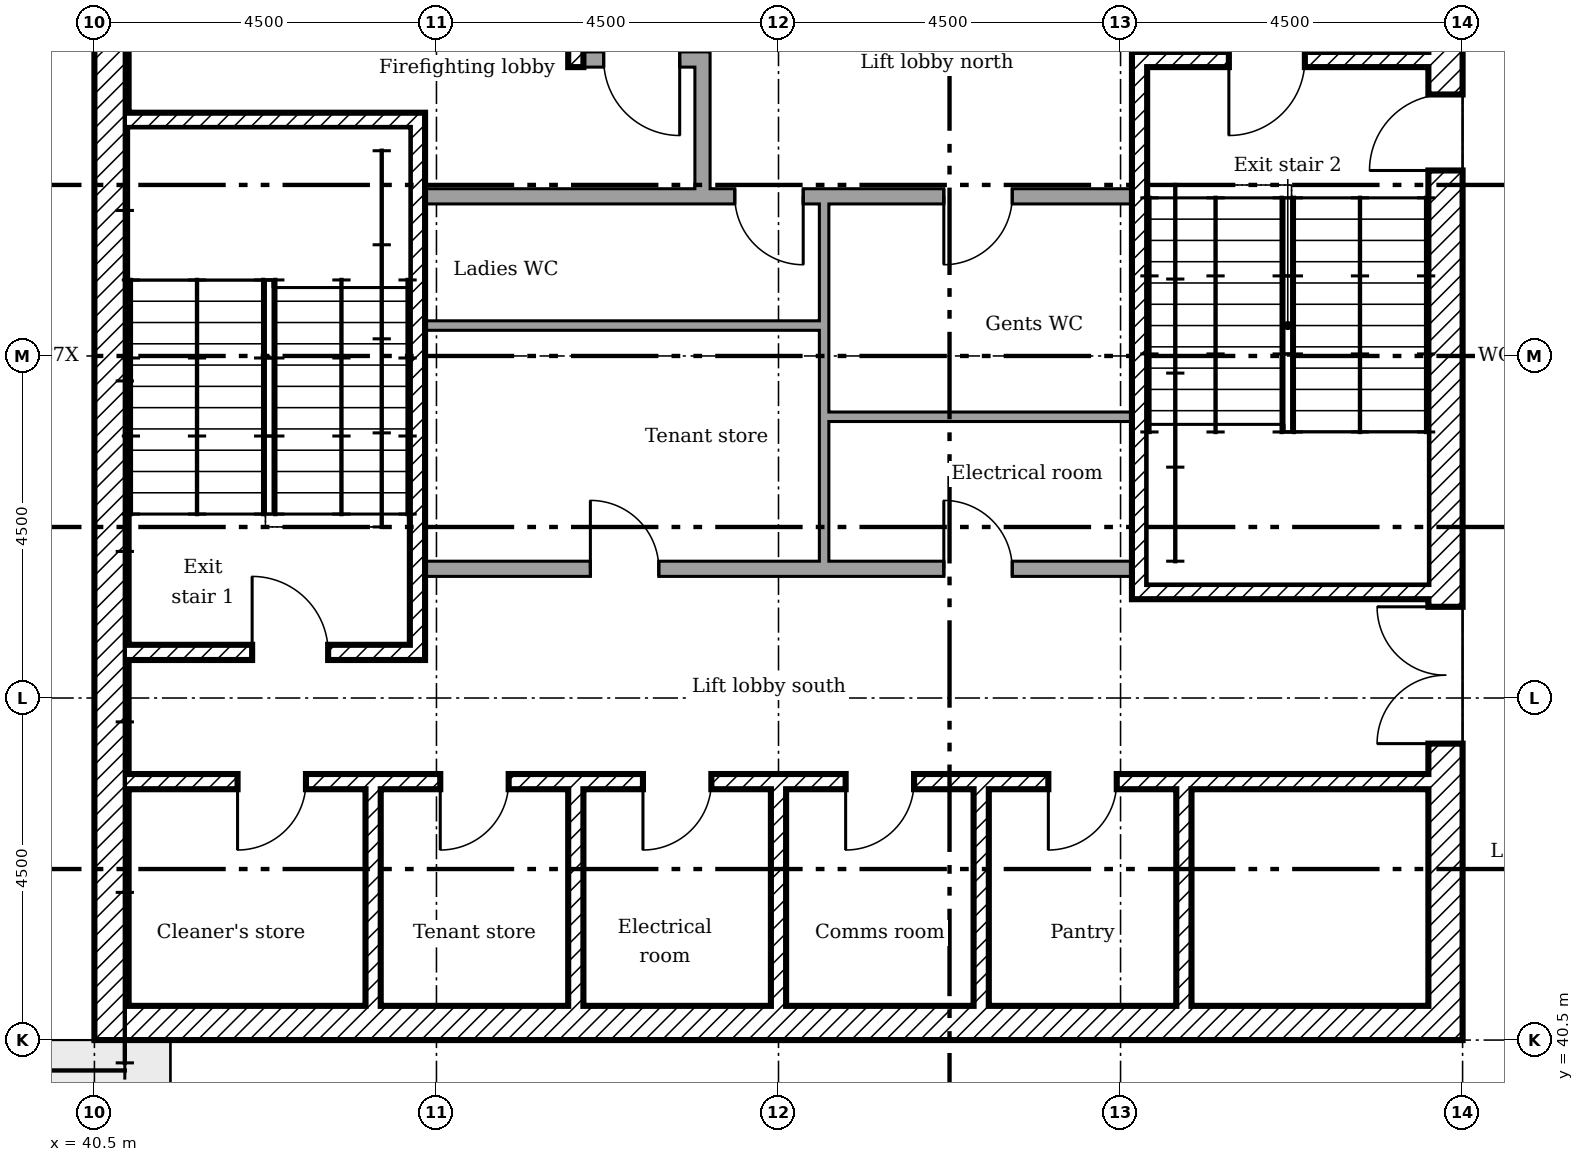
"""IFC4 building model, lengths in metres.
Left out: names, types, materials, properties, quantities, classifications, styles, units other than length and angle.
Written with IfcOpenShell. Run it as: python <this file> out.ifc"""

import sys

from ifc_helpers import new_model, si_unit, direction, frame, frame_2d, origin, place, context, subcontext, project, spatial, rectangle, extrude, element, fill, save


model = new_model("IFC4")
c1 = context("Model", 3, precision=1e-05, world=origin(), true_north=direction((0.0, 1.0)))
c2 = subcontext(c1, "Body", "Model", "MODEL_VIEW")
j1 = project(units=[si_unit("LENGTHUNIT", "METRE"), si_unit("PLANEANGLEUNIT", "RADIAN")], contexts=[c1])
p1 = place(None, origin())
s1 = spatial("IfcSite", under=j1, at=p1, CompositionType="ELEMENT")
p2 = place(p1, origin())
s2 = spatial("IfcBuilding", under=s1, at=p2, CompositionType="ELEMENT")
p3 = place(p2, frame((0.0, 0.0, 259.4)))
s3 = spatial("IfcBuildingStorey", under=s2, at=p3, CompositionType="ELEMENT", Elevation=259.4)
p4 = place(p3, frame((58.275, 40.5, 0.0), z_axis=(0.0, 0.0, 1.0), x_axis=(0.0, 1.0, 0.0)))
e1 = element("IfcWall", 1, at=p4, inside=s3, PredefinedType="SHEAR", context=c2, shape_type="SweptSolid", body=[
    extrude(rectangle(XDim=18.0, YDim=0.45, at=frame_2d((9.0, 0.0))), origin(), (0.0, 0.0, 1.0), 3.925),
])
p5 = place(p4, frame((13.15, 0.0, 0.0)))
e2 = element("IfcOpeningElement", 2, at=p5, cuts=e1, PredefinedType="OPENING", context=c2, shape_type="SweptSolid", body=[
    extrude(rectangle(XDim=1.2, YDim=2.1, at=frame_2d((0.6, 1.05))), frame((0.0, 0.235, 0.0), z_axis=(0.0, -1.0, 0.0), x_axis=(1.0, 0.0, 0.0)), (0.0, 0.0, 1.0), 0.47),
])
p6 = place(p4, frame((3.9, 0.0, 0.0)))
e3 = element("IfcOpeningElement", 3, at=p6, cuts=e1, PredefinedType="OPENING", context=c2, shape_type="SweptSolid", body=[
    extrude(rectangle(XDim=1.8, YDim=2.1, at=frame_2d((0.9, 1.05))), frame((0.0, 0.235, 0.0), z_axis=(0.0, -1.0, 0.0), x_axis=(1.0, 0.0, 0.0)), (0.0, 0.0, 1.0), 0.47),
])
p7 = place(p4, frame((11.44, 0.0, 0.0)))
e4 = element("IfcOpeningElement", 4, at=p7, cuts=e1, PredefinedType="OPENING", context=c2, shape_type="SweptSolid", body=[
    extrude(rectangle(XDim=1.0, YDim=2.1, at=frame_2d((0.5, 1.05))), frame((0.0, 0.235, 0.0), z_axis=(0.0, -1.0, 0.0), x_axis=(1.0, 0.0, 0.0)), (0.0, 0.0, 1.0), 0.47),
])
p8 = place(p3, frame((40.5, 40.725, 0.0)))
e5 = element("IfcWall", 5, at=p8, inside=s3, PredefinedType="SHEAR", context=c2, shape_type="SweptSolid", body=[
    extrude(rectangle(XDim=17.55, YDim=0.45, at=frame_2d((8.775, 0.0))), origin(), (0.0, 0.0, 1.0), 3.925),
])
p9 = place(p3, frame((40.725, 40.95, 0.0), z_axis=(0.0, 0.0, 1.0), x_axis=(0.0, 1.0, 0.0)))
e6 = element("IfcWall", 6, at=p9, inside=s3, PredefinedType="SHEAR", context=c2, shape_type="SweptSolid", body=[
    extrude(rectangle(XDim=17.1, YDim=0.45, at=frame_2d((8.55, 0.0))), origin(), (0.0, 0.0, 1.0), 3.925),
])
p10 = place(p3, frame((46.833, 58.05, 0.0), z_axis=(0.0, 0.0, 1.0), x_axis=(0.0, -1.0, 0.0)))
e7 = element("IfcWall", 7, at=p10, inside=s3, PredefinedType="SHEAR", context=c2, shape_type="SweptSolid", body=[
    extrude(rectangle(XDim=4.75, YDim=0.2, at=frame_2d((2.375, 0.0))), origin(), (0.0, 0.0, 1.0), 3.925),
])
for number, where, z_axis, x_axis in (
    (8, (44.167, 40.95, 0.0), (0.0, 0.0, 1.0), (0.0, 1.0, 0.0)),
    (9, (46.833, 40.95, 0.0), (0.0, 0.0, 1.0), (0.0, 1.0, 0.0)),
    (10, (49.5, 40.95, 0.0), (0.0, 0.0, 1.0), (0.0, 1.0, 0.0)),
    (11, (52.167, 40.95, 0.0), (0.0, 0.0, 1.0), (0.0, 1.0, 0.0)),
    (12, (54.833, 40.95, 0.0), (0.0, 0.0, 1.0), (0.0, 1.0, 0.0)),
):
    element("IfcWall", number, at=place(p3, frame(where, z_axis=z_axis, x_axis=x_axis)), inside=s3, PredefinedType="SHEAR", context=c2, shape_type="SweptSolid", body=[
        extrude(rectangle(XDim=2.85, YDim=0.2, at=frame_2d((1.425, 0.0))), origin(), (0.0, 0.0, 1.0), 3.925),
    ])
p11 = place(p3, frame((48.5, 51.6, 0.0), z_axis=(0.0, 0.0, 1.0), x_axis=(0.0, 1.0, 0.0)))
e13 = element("IfcWall", 13, at=p11, inside=s3, PredefinedType="PARTITIONING", context=c2, shape_type="SweptSolid", body=[
    extrude(rectangle(XDim=1.9, YDim=0.2, at=frame_2d((0.95, 0.0))), origin(), (0.0, 0.0, 1.0), 3.925),
])
p12 = place(p3, frame((46.933, 53.4, 0.0)))
e14 = element("IfcWall", 14, at=p12, inside=s3, PredefinedType="PARTITIONING", context=c2, shape_type="SweptSolid", body=[
    extrude(rectangle(XDim=1.467, YDim=0.2, at=frame_2d((0.733, 0.0))), origin(), (0.0, 0.0, 1.0), 3.925),
])
p13 = place(p12, frame((0.267, 0.0, 0.0)))
e15 = element("IfcOpeningElement", 15, at=p13, cuts=e14, PredefinedType="OPENING", context=c2, shape_type="SweptSolid", body=[
    extrude(rectangle(XDim=1.0, YDim=2.1, at=frame_2d((0.5, 1.05))), frame((0.0, 0.11, 0.0), z_axis=(0.0, -1.0, 0.0), x_axis=(1.0, 0.0, 0.0)), (0.0, 0.0, 1.0), 0.22),
])
p14 = place(p3, frame((40.95, 43.9, 0.0)))
e16 = element("IfcWall", 16, at=p14, inside=s3, PredefinedType="SHEAR", context=c2, shape_type="SweptSolid", body=[
    extrude(rectangle(XDim=17.1, YDim=0.2, at=frame_2d((8.55, 0.0))), origin(), (0.0, 0.0, 1.0), 3.925),
])
p15 = place(p14, frame((1.433, 0.0, 0.0)))
e17 = element("IfcOpeningElement", 17, at=p15, cuts=e16, PredefinedType="OPENING", context=c2, shape_type="SweptSolid", body=[
    extrude(rectangle(XDim=0.9, YDim=2.1, at=frame_2d((0.45, 1.05))), frame((0.0, 0.11, 0.0), z_axis=(0.0, -1.0, 0.0), x_axis=(1.0, 0.0, 0.0)), (0.0, 0.0, 1.0), 0.22),
])
p16 = place(p14, frame((4.1, 0.0, 0.0)))
e18 = element("IfcOpeningElement", 18, at=p16, cuts=e16, PredefinedType="OPENING", context=c2, shape_type="SweptSolid", body=[
    extrude(rectangle(XDim=0.9, YDim=2.1, at=frame_2d((0.45, 1.05))), frame((0.0, 0.11, 0.0), z_axis=(0.0, -1.0, 0.0), x_axis=(1.0, 0.0, 0.0)), (0.0, 0.0, 1.0), 0.22),
])
p17 = place(p14, frame((6.767, 0.0, 0.0)))
e19 = element("IfcOpeningElement", 19, at=p17, cuts=e16, PredefinedType="OPENING", context=c2, shape_type="SweptSolid", body=[
    extrude(rectangle(XDim=0.9, YDim=2.1, at=frame_2d((0.45, 1.05))), frame((0.0, 0.11, 0.0), z_axis=(0.0, -1.0, 0.0), x_axis=(1.0, 0.0, 0.0)), (0.0, 0.0, 1.0), 0.22),
])
p18 = place(p14, frame((9.433, 0.0, 0.0)))
e20 = element("IfcOpeningElement", 20, at=p18, cuts=e16, PredefinedType="OPENING", context=c2, shape_type="SweptSolid", body=[
    extrude(rectangle(XDim=0.9, YDim=2.1, at=frame_2d((0.45, 1.05))), frame((0.0, 0.11, 0.0), z_axis=(0.0, -1.0, 0.0), x_axis=(1.0, 0.0, 0.0)), (0.0, 0.0, 1.0), 0.22),
])
p19 = place(p14, frame((12.1, 0.0, 0.0)))
e21 = element("IfcOpeningElement", 21, at=p19, cuts=e16, PredefinedType="OPENING", context=c2, shape_type="SweptSolid", body=[
    extrude(rectangle(XDim=0.9, YDim=2.1, at=frame_2d((0.45, 1.05))), frame((0.0, 0.11, 0.0), z_axis=(0.0, -1.0, 0.0), x_axis=(1.0, 0.0, 0.0)), (0.0, 0.0, 1.0), 0.22),
])
p20 = place(p3, frame((44.75, 45.5, 0.0), z_axis=(0.0, 0.0, 1.0), x_axis=(0.0, 1.0, 0.0)))
e22 = element("IfcWall", 22, at=p20, inside=s3, PredefinedType="SHEAR", context=c2, shape_type="SweptSolid", body=[
    extrude(rectangle(XDim=7.2, YDim=0.2, at=frame_2d((3.6, 0.0))), origin(), (0.0, 0.0, 1.0), 3.925),
])
p21 = place(p3, frame((40.95, 52.6, 0.0)))
e23 = element("IfcWall", 23, at=p21, inside=s3, PredefinedType="SHEAR", context=c2, shape_type="SweptSolid", body=[
    extrude(rectangle(XDim=3.7, YDim=0.2, at=frame_2d((1.85, 0.0))), origin(), (0.0, 0.0, 1.0), 3.925),
])
p22 = place(p3, frame((40.95, 45.6, 0.0)))
e24 = element("IfcWall", 24, at=p22, inside=s3, PredefinedType="SHEAR", context=c2, shape_type="SweptSolid", body=[
    extrude(rectangle(XDim=3.7, YDim=0.2, at=frame_2d((1.85, 0.0))), origin(), (0.0, 0.0, 1.0), 3.925),
])
p23 = place(p22, frame((1.625, 0.0, 0.0)))
e25 = element("IfcOpeningElement", 25, at=p23, cuts=e24, PredefinedType="OPENING", context=c2, shape_type="SweptSolid", body=[
    extrude(rectangle(XDim=1.0, YDim=2.1, at=frame_2d((0.5, 1.05))), frame((0.0, 0.11, 0.0), z_axis=(0.0, -1.0, 0.0), x_axis=(1.0, 0.0, 0.0)), (0.0, 0.0, 1.0), 0.22),
])
p24 = place(p3, frame((54.15, 53.4, 0.0)))
e26 = element("IfcWall", 26, at=p24, inside=s3, PredefinedType="SHEAR", context=c2, shape_type="SweptSolid", body=[
    extrude(rectangle(XDim=3.9, YDim=0.2, at=frame_2d((1.95, 0.0))), origin(), (0.0, 0.0, 1.0), 3.925),
])
p25 = place(p24, frame((1.275, 0.0, 0.0)))
e27 = element("IfcOpeningElement", 27, at=p25, cuts=e26, PredefinedType="OPENING", context=c2, shape_type="SweptSolid", body=[
    extrude(rectangle(XDim=1.0, YDim=2.1, at=frame_2d((0.5, 1.05))), frame((0.0, 0.11, 0.0), z_axis=(0.0, -1.0, 0.0), x_axis=(1.0, 0.0, 0.0)), (0.0, 0.0, 1.0), 0.22),
])
p26 = place(p3, frame((54.15, 46.4, 0.0)))
e28 = element("IfcWall", 28, at=p26, inside=s3, PredefinedType="SHEAR", context=c2, shape_type="SweptSolid", body=[
    extrude(rectangle(XDim=3.9, YDim=0.2, at=frame_2d((1.95, 0.0))), origin(), (0.0, 0.0, 1.0), 3.925),
])
p27 = place(p3, frame((54.25, 46.5, 0.0), z_axis=(0.0, 0.0, 1.0), x_axis=(0.0, 1.0, 0.0)))
e29 = element("IfcWall", 29, at=p27, inside=s3, PredefinedType="SHEAR", context=c2, shape_type="SweptSolid", body=[
    extrude(rectangle(XDim=6.8, YDim=0.2, at=frame_2d((3.4, 0.0))), origin(), (0.0, 0.0, 1.0), 3.925),
])
p28 = place(p3, frame((44.85, 51.6, 0.0)))
e30 = element("IfcWall", 30, at=p28, inside=s3, PredefinedType="PARTITIONING", context=c2, shape_type="SweptSolid", body=[
    extrude(rectangle(XDim=9.3, YDim=0.2, at=frame_2d((4.65, 0.0))), origin(), (0.0, 0.0, 1.0), 3.925),
])
p29 = place(p28, frame((4.075, 0.0, 0.0)))
e31 = element("IfcOpeningElement", 31, at=p29, cuts=e30, PredefinedType="OPENING", context=c2, shape_type="SweptSolid", body=[
    extrude(rectangle(XDim=0.9, YDim=2.1, at=frame_2d((0.45, 1.05))), frame((0.0, 0.11, 0.0), z_axis=(0.0, -1.0, 0.0), x_axis=(1.0, 0.0, 0.0)), (0.0, 0.0, 1.0), 0.22),
])
p30 = place(p28, frame((6.825, 0.0, 0.0)))
e32 = element("IfcOpeningElement", 32, at=p30, cuts=e30, PredefinedType="OPENING", context=c2, shape_type="SweptSolid", body=[
    extrude(rectangle(XDim=0.9, YDim=2.1, at=frame_2d((0.45, 1.05))), frame((0.0, 0.11, 0.0), z_axis=(0.0, -1.0, 0.0), x_axis=(1.0, 0.0, 0.0)), (0.0, 0.0, 1.0), 0.22),
])
p31 = place(p3, frame((44.85, 46.7, 0.0)))
e33 = element("IfcWall", 33, at=p31, inside=s3, PredefinedType="PARTITIONING", context=c2, shape_type="SweptSolid", body=[
    extrude(rectangle(XDim=9.3, YDim=0.2, at=frame_2d((4.65, 0.0))), origin(), (0.0, 0.0, 1.0), 3.925),
])
p32 = place(p31, frame((2.175, 0.0, 0.0)))
e34 = element("IfcOpeningElement", 34, at=p32, cuts=e33, PredefinedType="OPENING", context=c2, shape_type="SweptSolid", body=[
    extrude(rectangle(XDim=0.9, YDim=2.1, at=frame_2d((0.45, 1.05))), frame((0.0, 0.11, 0.0), z_axis=(0.0, -1.0, 0.0), x_axis=(1.0, 0.0, 0.0)), (0.0, 0.0, 1.0), 0.22),
])
p33 = place(p31, frame((6.825, 0.0, 0.0)))
e35 = element("IfcOpeningElement", 35, at=p33, cuts=e33, PredefinedType="OPENING", context=c2, shape_type="SweptSolid", body=[
    extrude(rectangle(XDim=0.9, YDim=2.1, at=frame_2d((0.45, 1.05))), frame((0.0, 0.11, 0.0), z_axis=(0.0, -1.0, 0.0), x_axis=(1.0, 0.0, 0.0)), (0.0, 0.0, 1.0), 0.22),
])
p34 = place(p3, frame((50.1, 46.8, 0.0), z_axis=(0.0, 0.0, 1.0), x_axis=(0.0, 1.0, 0.0)))
e36 = element("IfcWall", 36, at=p34, inside=s3, PredefinedType="PARTITIONING", context=c2, shape_type="SweptSolid", body=[
    extrude(rectangle(XDim=1.962, YDim=0.125, at=frame_2d((0.981, 0.0))), origin(), (0.0, 0.0, 1.0), 3.925),
])
p35 = place(p3, frame((54.15, 48.7, 0.0), z_axis=(0.0, 0.0, 1.0), x_axis=(-1.0, 0.0, 0.0)))
e37 = element("IfcWall", 37, at=p35, inside=s3, PredefinedType="PARTITIONING", context=c2, shape_type="SweptSolid", body=[
    extrude(rectangle(XDim=3.987, YDim=0.125, at=frame_2d((1.994, 0.0))), origin(), (0.0, 0.0, 1.0), 3.925),
])
p36 = place(p3, frame((50.1, 48.7, 0.0), z_axis=(0.0, 0.0, 1.0), x_axis=(0.0, 1.0, 0.0)))
e38 = element("IfcWall", 38, at=p36, inside=s3, PredefinedType="PARTITIONING", context=c2, shape_type="SweptSolid", body=[
    extrude(rectangle(XDim=1.262, YDim=0.125, at=frame_2d((0.631, 0.0))), origin(), (0.0, 0.0, 1.0), 3.925),
])
p37 = place(p3, frame((50.038, 49.9, 0.0), z_axis=(0.0, 0.0, 1.0), x_axis=(-1.0, 0.0, 0.0)))
e39 = element("IfcWall", 39, at=p37, inside=s3, PredefinedType="PARTITIONING", context=c2, shape_type="SweptSolid", body=[
    extrude(rectangle(XDim=5.188, YDim=0.125, at=frame_2d((2.594, 0.0))), origin(), (0.0, 0.0, 1.0), 3.925),
])
p38 = place(p3, frame((50.1, 49.9, 0.0), z_axis=(0.0, 0.0, 1.0), x_axis=(0.0, 1.0, 0.0)))
e40 = element("IfcWall", 40, at=p38, inside=s3, PredefinedType="PARTITIONING", context=c2, shape_type="SweptSolid", body=[
    extrude(rectangle(XDim=1.6, YDim=0.125, at=frame_2d((0.8, 0.0))), origin(), (0.0, 0.0, 1.0), 3.925),
])
p39 = place(p6, origin())
e41 = element("IfcDoor", 41, at=p39, inside=s3, OperationType="DOUBLE_DOOR_SINGLE_SWING", PredefinedType="DOOR", context=c2, shape_type="SweptSolid", body=[
    extrude(rectangle(XDim=1.8, YDim=2.1, at=frame_2d((0.9, 1.05))), frame((0.0, 0.025, 0.0), z_axis=(0.0, -1.0, 0.0), x_axis=(1.0, 0.0, 0.0)), (0.0, 0.0, 1.0), 0.05),
])
fill(e3, e41)
p40 = place(p23, origin())
e42 = element("IfcDoor", 42, at=p40, inside=s3, OperationType="SINGLE_SWING_RIGHT", PredefinedType="DOOR", context=c2, shape_type="SweptSolid", body=[
    extrude(rectangle(XDim=1.0, YDim=2.1, at=frame_2d((0.5, 1.05))), frame((0.0, 0.025, 0.0), z_axis=(0.0, -1.0, 0.0), x_axis=(1.0, 0.0, 0.0)), (0.0, 0.0, 1.0), 0.05),
])
fill(e25, e42)
p41 = place(p25, frame((1.0, 0.0, 0.0), x_axis=(-1.0, 0.0, 0.0)))
e43 = element("IfcDoor", 43, at=p41, inside=s3, OperationType="SINGLE_SWING_LEFT", PredefinedType="DOOR", context=c2, shape_type="SweptSolid", body=[
    extrude(rectangle(XDim=1.0, YDim=2.1, at=frame_2d((0.5, 1.05))), frame((0.0, 0.025, 0.0), z_axis=(0.0, -1.0, 0.0), x_axis=(1.0, 0.0, 0.0)), (0.0, 0.0, 1.0), 0.05),
])
fill(e27, e43)
p42 = place(p7, origin())
e44 = element("IfcDoor", 44, at=p42, inside=s3, OperationType="SINGLE_SWING_RIGHT", PredefinedType="DOOR", context=c2, shape_type="SweptSolid", body=[
    extrude(rectangle(XDim=1.0, YDim=2.1, at=frame_2d((0.5, 1.05))), frame((0.0, 0.025, 0.0), z_axis=(0.0, -1.0, 0.0), x_axis=(1.0, 0.0, 0.0)), (0.0, 0.0, 1.0), 0.05),
])
fill(e4, e44)
p43 = place(p13, frame((1.0, 0.0, 0.0), x_axis=(-1.0, 0.0, 0.0)))
e45 = element("IfcDoor", 45, at=p43, inside=s3, OperationType="SINGLE_SWING_RIGHT", PredefinedType="DOOR", context=c2, shape_type="SweptSolid", body=[
    extrude(rectangle(XDim=1.0, YDim=2.1, at=frame_2d((0.5, 1.05))), frame((0.0, 0.025, 0.0), z_axis=(0.0, -1.0, 0.0), x_axis=(1.0, 0.0, 0.0)), (0.0, 0.0, 1.0), 0.05),
])
fill(e15, e45)
p44 = place(p15, frame((0.9, 0.0, 0.0), x_axis=(-1.0, 0.0, 0.0)))
e46 = element("IfcDoor", 46, at=p44, inside=s3, OperationType="SINGLE_SWING_LEFT", PredefinedType="DOOR", context=c2, shape_type="SweptSolid", body=[
    extrude(rectangle(XDim=0.9, YDim=2.1, at=frame_2d((0.45, 1.05))), frame((0.0, 0.025, 0.0), z_axis=(0.0, -1.0, 0.0), x_axis=(1.0, 0.0, 0.0)), (0.0, 0.0, 1.0), 0.05),
])
fill(e17, e46)
p45 = place(p16, frame((0.9, 0.0, 0.0), x_axis=(-1.0, 0.0, 0.0)))
e47 = element("IfcDoor", 47, at=p45, inside=s3, OperationType="SINGLE_SWING_LEFT", PredefinedType="DOOR", context=c2, shape_type="SweptSolid", body=[
    extrude(rectangle(XDim=0.9, YDim=2.1, at=frame_2d((0.45, 1.05))), frame((0.0, 0.025, 0.0), z_axis=(0.0, -1.0, 0.0), x_axis=(1.0, 0.0, 0.0)), (0.0, 0.0, 1.0), 0.05),
])
fill(e18, e47)
p46 = place(p17, frame((0.9, 0.0, 0.0), x_axis=(-1.0, 0.0, 0.0)))
e48 = element("IfcDoor", 48, at=p46, inside=s3, OperationType="SINGLE_SWING_LEFT", PredefinedType="DOOR", context=c2, shape_type="SweptSolid", body=[
    extrude(rectangle(XDim=0.9, YDim=2.1, at=frame_2d((0.45, 1.05))), frame((0.0, 0.025, 0.0), z_axis=(0.0, -1.0, 0.0), x_axis=(1.0, 0.0, 0.0)), (0.0, 0.0, 1.0), 0.05),
])
fill(e19, e48)
p47 = place(p18, frame((0.9, 0.0, 0.0), x_axis=(-1.0, 0.0, 0.0)))
e49 = element("IfcDoor", 49, at=p47, inside=s3, OperationType="SINGLE_SWING_LEFT", PredefinedType="DOOR", context=c2, shape_type="SweptSolid", body=[
    extrude(rectangle(XDim=0.9, YDim=2.1, at=frame_2d((0.45, 1.05))), frame((0.0, 0.025, 0.0), z_axis=(0.0, -1.0, 0.0), x_axis=(1.0, 0.0, 0.0)), (0.0, 0.0, 1.0), 0.05),
])
fill(e20, e49)
p48 = place(p19, frame((0.9, 0.0, 0.0), x_axis=(-1.0, 0.0, 0.0)))
e50 = element("IfcDoor", 50, at=p48, inside=s3, OperationType="SINGLE_SWING_LEFT", PredefinedType="DOOR", context=c2, shape_type="SweptSolid", body=[
    extrude(rectangle(XDim=0.9, YDim=2.1, at=frame_2d((0.45, 1.05))), frame((0.0, 0.025, 0.0), z_axis=(0.0, -1.0, 0.0), x_axis=(1.0, 0.0, 0.0)), (0.0, 0.0, 1.0), 0.05),
])
fill(e21, e50)
p49 = place(p32, origin())
e51 = element("IfcDoor", 51, at=p49, inside=s3, OperationType="SINGLE_SWING_RIGHT", PredefinedType="DOOR", context=c2, shape_type="SweptSolid", body=[
    extrude(rectangle(XDim=0.9, YDim=2.1, at=frame_2d((0.45, 1.05))), frame((0.0, 0.025, 0.0), z_axis=(0.0, -1.0, 0.0), x_axis=(1.0, 0.0, 0.0)), (0.0, 0.0, 1.0), 0.05),
])
fill(e34, e51)
p50 = place(p29, frame((0.9, 0.0, 0.0), x_axis=(-1.0, 0.0, 0.0)))
e52 = element("IfcDoor", 52, at=p50, inside=s3, OperationType="SINGLE_SWING_RIGHT", PredefinedType="DOOR", context=c2, shape_type="SweptSolid", body=[
    extrude(rectangle(XDim=0.9, YDim=2.1, at=frame_2d((0.45, 1.05))), frame((0.0, 0.025, 0.0), z_axis=(0.0, -1.0, 0.0), x_axis=(1.0, 0.0, 0.0)), (0.0, 0.0, 1.0), 0.05),
])
fill(e31, e52)
p51 = place(p33, origin())
e53 = element("IfcDoor", 53, at=p51, inside=s3, OperationType="SINGLE_SWING_RIGHT", PredefinedType="DOOR", context=c2, shape_type="SweptSolid", body=[
    extrude(rectangle(XDim=0.9, YDim=2.1, at=frame_2d((0.45, 1.05))), frame((0.0, 0.025, 0.0), z_axis=(0.0, -1.0, 0.0), x_axis=(1.0, 0.0, 0.0)), (0.0, 0.0, 1.0), 0.05),
])
fill(e35, e53)
p52 = place(p30, frame((0.9, 0.0, 0.0), x_axis=(-1.0, 0.0, 0.0)))
e54 = element("IfcDoor", 54, at=p52, inside=s3, OperationType="SINGLE_SWING_LEFT", PredefinedType="DOOR", context=c2, shape_type="SweptSolid", body=[
    extrude(rectangle(XDim=0.9, YDim=2.1, at=frame_2d((0.45, 1.05))), frame((0.0, 0.025, 0.0), z_axis=(0.0, -1.0, 0.0), x_axis=(1.0, 0.0, 0.0)), (0.0, 0.0, 1.0), 0.05),
])
fill(e32, e54)
save(model, sys.argv[1])
